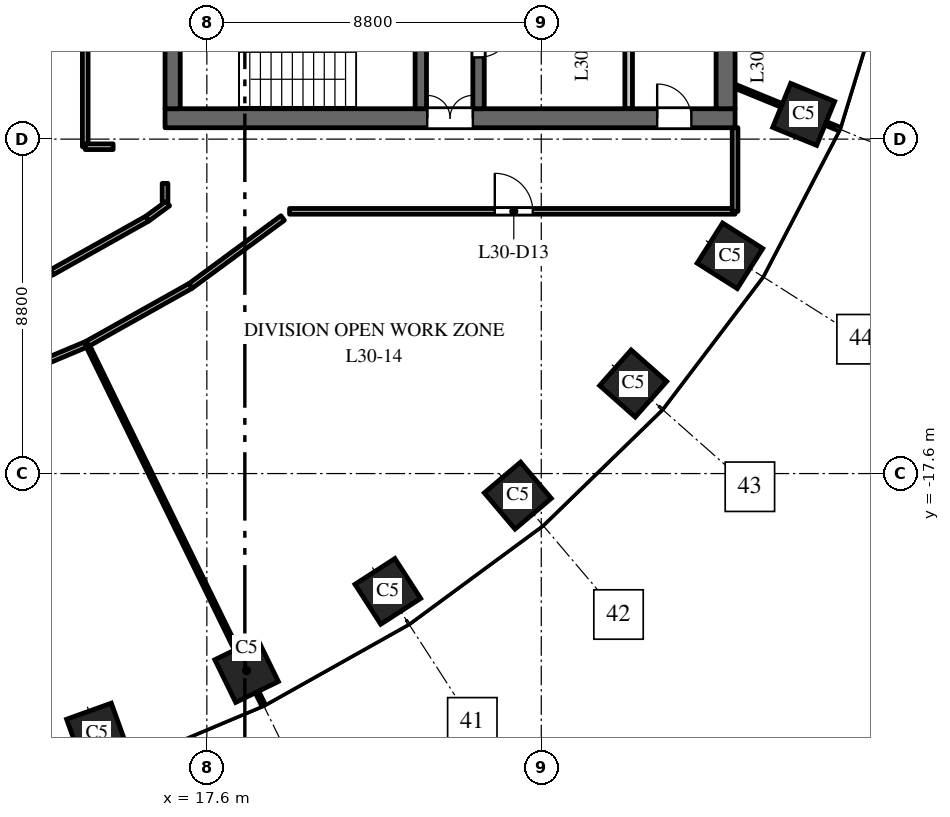
"""IFC4 building model, lengths in metres.
Left out: names, types, materials, properties, quantities, classifications, styles, units other than length and angle.
Written with IfcOpenShell. Run it as: python <this file> out.ifc"""

import sys

from ifc_helpers import new_model, si_unit, direction, frame, frame_2d, origin, origin_2d, place, context, subcontext, project, spatial, rectangle, extrude, element, fill, save


model = new_model("IFC4")
c1 = context("Model", 3, precision=1e-05, world=origin(), true_north=direction((0.0, 1.0)))
c2 = subcontext(c1, "Body", "Model", "MODEL_VIEW")
j1 = project(units=[si_unit("LENGTHUNIT", "METRE"), si_unit("PLANEANGLEUNIT", "RADIAN")], contexts=[c1])
p1 = place(None, origin())
s1 = spatial("IfcSite", under=j1, at=p1, CompositionType="ELEMENT")
p2 = place(p1, origin())
s2 = spatial("IfcBuilding", under=s1, at=p2, CompositionType="ELEMENT")
p3 = place(p2, frame((0.0, 0.0, 132.0)))
s3 = spatial("IfcBuildingStorey", under=s2, at=p3, CompositionType="ELEMENT", Elevation=132.0)
for number, where, z_axis, x_axis in (
    (1, (14.709, -24.441, 0.0), (0.0, 0.0, 1.0), (0.941, 0.338, 0.0)),
    (2, (18.646, -22.785, 0.0), (0.0, 0.0, 1.0), (0.898, 0.439, 0.0)),
    (3, (22.362, -20.7, 0.0), (0.0, 0.0, 1.0), (0.84, 0.542, 0.0)),
    (4, (25.783, -18.18, 0.0), (0.0, 0.0, 1.0), (0.763, 0.646, 0.0)),
    (5, (28.819, -15.23, 0.0), (0.0, 0.0, 1.0), (0.663, 0.749, 0.0)),
    (6, (31.365, -11.871, 0.0), (0.0, 0.0, 1.0), (0.535, 0.845, 0.0)),
    (7, (33.305, -8.149, 0.0), (0.0, 0.0, 1.0), (0.379, 0.925, 0.0)),
):
    element("IfcColumn", number, at=place(p3, frame(where, z_axis=z_axis, x_axis=x_axis)), inside=s3, PredefinedType="COLUMN", context=c2, shape_type="SweptSolid", body=[
        extrude(rectangle(XDim=1.25, YDim=1.25, at=origin_2d()), origin(), (0.0, 0.0, 1.0), 4.0),
    ])
p4 = place(p3, frame((16.5, -8.25, 0.0), z_axis=(0.0, 0.0, 1.0), x_axis=(1.0, 0.0, 0.0)))
e8 = element("IfcWall", 8, at=p4, inside=s3, PredefinedType="SHEAR", context=c2, shape_type="SweptSolid", body=[
    extrude(rectangle(XDim=15.0, YDim=0.5, at=frame_2d((7.5, 0.0))), origin(), (0.0, 0.0, 1.0), 3.7),
])
p5 = place(p4, frame((6.9, 0.0, 0.0)))
e9 = element("IfcOpeningElement", 9, at=p5, cuts=e8, PredefinedType="OPENING", context=c2, shape_type="SweptSolid", body=[
    extrude(rectangle(XDim=1.2, YDim=2.1, at=frame_2d((0.6, 1.05))), frame((0.0, 0.26, 0.0), z_axis=(0.0, -1.0, 0.0), x_axis=(1.0, 0.0, 0.0)), (0.0, 0.0, 1.0), 0.52),
])
p6 = place(p4, frame((12.95, 0.0, 0.0)))
e10 = element("IfcOpeningElement", 10, at=p6, cuts=e8, PredefinedType="OPENING", context=c2, shape_type="SweptSolid", body=[
    extrude(rectangle(XDim=0.9, YDim=2.1, at=frame_2d((0.45, 1.05))), frame((0.0, 0.26, 0.0), z_axis=(0.0, -1.0, 0.0), x_axis=(1.0, 0.0, 0.0)), (0.0, 0.0, 1.0), 0.52),
])
p7 = place(p3, frame((24.75, -8.0, 0.0), z_axis=(0.0, 0.0, 1.0), x_axis=(0.0, 1.0, 0.0)))
e11 = element("IfcWall", 11, at=p7, inside=s3, PredefinedType="SHEAR", context=c2, shape_type="SweptSolid", body=[
    extrude(rectangle(XDim=16.0, YDim=0.3, at=frame_2d((8.0, 0.0))), origin(), (0.0, 0.0, 1.0), 3.7),
])
p8 = place(p7, frame((4.425, 0.0, 0.0)))
e12 = element("IfcOpeningElement", 12, at=p8, cuts=e11, PredefinedType="OPENING", context=c2, shape_type="SweptSolid", body=[
    extrude(rectangle(XDim=1.1, YDim=2.1, at=frame_2d((0.55, 1.05))), frame((0.0, 0.16, 0.0), z_axis=(0.0, -1.0, 0.0), x_axis=(1.0, 0.0, 0.0)), (0.0, 0.0, 1.0), 0.32),
])
p9 = place(p7, frame((7.45, 0.0, 0.0)))
e13 = element("IfcOpeningElement", 13, at=p9, cuts=e11, PredefinedType="OPENING", context=c2, shape_type="SweptSolid", body=[
    extrude(rectangle(XDim=1.1, YDim=2.1, at=frame_2d((0.55, 1.05))), frame((0.0, 0.16, 0.0), z_axis=(0.0, -1.0, 0.0), x_axis=(1.0, 0.0, 0.0)), (0.0, 0.0, 1.0), 0.32),
])
p10 = place(p7, frame((10.425, 0.0, 0.0)))
e14 = element("IfcOpeningElement", 14, at=p10, cuts=e11, PredefinedType="OPENING", context=c2, shape_type="SweptSolid", body=[
    extrude(rectangle(XDim=1.2, YDim=2.1, at=frame_2d((0.6, 1.05))), frame((0.0, 0.16, 0.0), z_axis=(0.0, -1.0, 0.0), x_axis=(1.0, 0.0, 0.0)), (0.0, 0.0, 1.0), 0.32),
])
p11 = place(p7, frame((13.125, 0.0, 0.0)))
e15 = element("IfcOpeningElement", 15, at=p11, cuts=e11, PredefinedType="OPENING", context=c2, shape_type="SweptSolid", body=[
    extrude(rectangle(XDim=0.9, YDim=2.1, at=frame_2d((0.45, 1.05))), frame((0.0, 0.16, 0.0), z_axis=(0.0, -1.0, 0.0), x_axis=(1.0, 0.0, 0.0)), (0.0, 0.0, 1.0), 0.32),
])
p12 = place(p7, frame((14.75, 0.0, 0.0)))
e16 = element("IfcOpeningElement", 16, at=p12, cuts=e11, PredefinedType="OPENING", context=c2, shape_type="SweptSolid", body=[
    extrude(rectangle(XDim=0.9, YDim=2.1, at=frame_2d((0.45, 1.05))), frame((0.0, 0.16, 0.0), z_axis=(0.0, -1.0, 0.0), x_axis=(1.0, 0.0, 0.0)), (0.0, 0.0, 1.0), 0.32),
])
p13 = place(p7, frame((1.35, 0.0, 0.0)))
e17 = element("IfcOpeningElement", 17, at=p13, cuts=e11, PredefinedType="OPENING", context=c2, shape_type="SweptSolid", body=[
    extrude(rectangle(XDim=0.9, YDim=2.1, at=frame_2d((0.45, 1.05))), frame((0.0, 0.16, 0.0), z_axis=(0.0, -1.0, 0.0), x_axis=(1.0, 0.0, 0.0)), (0.0, 0.0, 1.0), 0.32),
])
p14 = place(p3, frame((16.7, -8.0, 0.0), z_axis=(0.0, 0.0, 1.0), x_axis=(0.0, 1.0, 0.0)))
e18 = element("IfcWall", 18, at=p14, inside=s3, PredefinedType="SHEAR", context=c2, shape_type="SweptSolid", body=[
    extrude(rectangle(XDim=16.0, YDim=0.4, at=frame_2d((8.0, 0.0))), origin(), (0.0, 0.0, 1.0), 3.7),
])
p15 = place(p3, frame((31.25, -8.0, 0.0), z_axis=(0.0, 0.0, 1.0), x_axis=(0.0, 1.0, 0.0)))
e19 = element("IfcWall", 19, at=p15, inside=s3, PredefinedType="SHEAR", context=c2, shape_type="SweptSolid", body=[
    extrude(rectangle(XDim=16.0, YDim=0.5, at=frame_2d((8.0, 0.0))), origin(), (0.0, 0.0, 1.0), 3.7),
])
p16 = place(p3, frame((28.7, -8.0, 0.0), z_axis=(0.0, 0.0, 1.0), x_axis=(0.0, 1.0, 0.0)))
e20 = element("IfcWall", 20, at=p16, inside=s3, PredefinedType="PARTITIONING", context=c2, shape_type="SweptSolid", body=[
    extrude(rectangle(XDim=3.25, YDim=0.2, at=frame_2d((1.625, 0.0))), origin(), (0.0, 0.0, 1.0), 3.7),
])
p17 = place(p3, frame((23.23, -8.0, 0.0), z_axis=(0.0, 0.0, 1.0), x_axis=(0.0, 1.0, 0.0)))
e21 = element("IfcWall", 21, at=p17, inside=s3, PredefinedType="SHEAR", context=c2, shape_type="SweptSolid", body=[
    extrude(rectangle(XDim=7.875, YDim=0.3, at=frame_2d((3.938, 0.0))), origin(), (0.0, 0.0, 1.0), 3.7),
])
p18 = place(p17, frame((5.15, 0.0, 0.0)))
e22 = element("IfcOpeningElement", 22, at=p18, cuts=e21, PredefinedType="OPENING", context=c2, shape_type="SweptSolid", body=[
    extrude(rectangle(XDim=1.1, YDim=2.1, at=frame_2d((0.55, 1.05))), frame((0.0, 0.16, 0.0), z_axis=(0.0, -1.0, 0.0), x_axis=(1.0, 0.0, 0.0)), (0.0, 0.0, 1.0), 0.32),
])
p19 = place(p3, frame((10.762, -13.463, 0.0), z_axis=(0.0, 0.0, 1.0), x_axis=(0.921848667289, 0.387550041438, 0.0)))
e23 = element("IfcWall", 23, at=p19, inside=s3, PredefinedType="PARTITIONING", context=c2, shape_type="SweptSolid", body=[
    extrude(rectangle(XDim=2.993, YDim=0.15, at=frame_2d((1.497, 0.0))), origin(), (0.0, 0.0, 1.0), 3.7),
])
p20 = place(p3, frame((11.473, -15.442, 0.0), z_axis=(0.0, 0.0, 1.0), x_axis=(0.921794929211, 0.387677841101, 0.0)))
e24 = element("IfcWall", 24, at=p20, inside=s3, PredefinedType="PARTITIONING", context=c2, shape_type="SweptSolid", body=[
    extrude(rectangle(XDim=3.224, YDim=0.15, at=frame_2d((1.612, 0.0))), origin(), (0.0, 0.0, 1.0), 3.7),
])
p21 = place(p3, frame((13.521, -12.303, 0.0), z_axis=(0.0, 0.0, 1.0), x_axis=(0.871948863789, 0.489596955604, 0.0)))
e25 = element("IfcWall", 25, at=p21, inside=s3, PredefinedType="PARTITIONING", context=c2, shape_type="SweptSolid", body=[
    extrude(rectangle(XDim=2.88, YDim=0.15, at=frame_2d((1.44, 0.0))), origin(), (0.0, 0.0, 1.0), 3.7),
])
p22 = place(p3, frame((14.4, -9.0, 0.0), z_axis=(0.0, 0.0, 1.0), x_axis=(0.0, 1.0, 0.0)))
e26 = element("IfcWall", 26, at=p22, inside=s3, PredefinedType="PARTITIONING", context=c2, shape_type="SweptSolid", body=[
    extrude(rectangle(XDim=18.0, YDim=0.15, at=frame_2d((9.0, 0.0))), origin(), (0.0, 0.0, 1.0), 2.75),
])
p23 = place(p22, frame((8.6, 0.0, 0.0)))
e27 = element("IfcOpeningElement", 27, at=p23, cuts=e26, PredefinedType="OPENING", context=c2, shape_type="SweptSolid", body=[
    extrude(rectangle(XDim=1.0, YDim=2.1, at=frame_2d((0.5, 1.05))), frame((0.0, 0.085, 0.0), z_axis=(0.0, -1.0, 0.0), x_axis=(1.0, 0.0, 0.0)), (0.0, 0.0, 1.0), 0.17),
])
p24 = place(p3, frame((14.4, -9.0, 0.0), z_axis=(0.0, 0.0, 1.0), x_axis=(1.0, 0.0, 0.0)))
e28 = element("IfcWall", 28, at=p24, inside=s3, PredefinedType="PARTITIONING", context=c2, shape_type="SweptSolid", body=[
    extrude(rectangle(XDim=0.734, YDim=0.15, at=frame_2d((0.367, 0.0))), origin(), (0.0, 0.0, 1.0), 3.7),
])
p25 = place(p3, frame((14.447, -14.196, 0.0), z_axis=(0.0, 0.0, 1.0), x_axis=(0.439198109491, -0.898390238493, 0.0)))
e29 = element("IfcWall", 29, at=p25, inside=s3, PredefinedType="PARTITIONING", context=c2, shape_type="SweptSolid", body=[
    extrude(rectangle(XDim=10.562, YDim=0.1, at=frame_2d((5.281, 0.0))), origin(), (0.0, 0.0, 1.0), 2.9),
])
p26 = place(p3, frame((14.462, -14.182, 0.0), z_axis=(0.0, 0.0, 1.0), x_axis=(0.872130780857, 0.489272828882, 0.0)))
e30 = element("IfcWall", 30, at=p26, inside=s3, PredefinedType="PARTITIONING", context=c2, shape_type="SweptSolid", body=[
    extrude(rectangle(XDim=3.109, YDim=0.15, at=frame_2d((1.554, 0.0))), origin(), (0.0, 0.0, 1.0), 3.7),
])
p27 = place(p3, frame((16.032, -10.893, 0.0), z_axis=(0.0, 0.0, 1.0), x_axis=(0.805701862575, 0.592321288359, 0.0)))
e31 = element("IfcWall", 31, at=p27, inside=s3, PredefinedType="PARTITIONING", context=c2, shape_type="SweptSolid", body=[
    extrude(rectangle(XDim=0.674, YDim=0.15, at=frame_2d((0.337, 0.0))), origin(), (0.0, 0.0, 1.0), 3.7),
])
p28 = place(p3, frame((16.5, -10.456, 0.0), z_axis=(0.0, 0.0, 1.0), x_axis=(0.0, 1.0, 0.0)))
e32 = element("IfcWall", 32, at=p28, inside=s3, PredefinedType="PARTITIONING", context=c2, shape_type="SweptSolid", body=[
    extrude(rectangle(XDim=0.492, YDim=0.15, at=frame_2d((0.246, 0.0))), origin(), (0.0, 0.0, 1.0), 3.7),
])
p29 = place(p3, frame((17.173, -12.661, 0.0), z_axis=(0.0, 0.0, 1.0), x_axis=(0.805151708762, 0.593068904831, 0.0)))
e33 = element("IfcWall", 33, at=p29, inside=s3, PredefinedType="PARTITIONING", context=c2, shape_type="SweptSolid", body=[
    extrude(rectangle(XDim=3.008, YDim=0.15, at=frame_2d((1.504, 0.0))), origin(), (0.0, 0.0, 1.0), 3.7),
])
p30 = place(p3, frame((19.777, -10.7, 0.0), z_axis=(0.0, 0.0, 1.0), x_axis=(1.0, 0.0, 0.0)))
e34 = element("IfcWall", 34, at=p30, inside=s3, PredefinedType="PARTITIONING", context=c2, shape_type="SweptSolid", body=[
    extrude(rectangle(XDim=11.723, YDim=0.15, at=frame_2d((5.861, 0.0))), origin(), (0.0, 0.0, 1.0), 2.75),
])
p31 = place(p30, frame((5.4, 0.0, 0.0)))
e35 = element("IfcOpeningElement", 35, at=p31, cuts=e34, PredefinedType="OPENING", context=c2, shape_type="SweptSolid", body=[
    extrude(rectangle(XDim=1.0, YDim=2.1, at=frame_2d((0.5, 1.05))), frame((0.0, 0.085, 0.0), z_axis=(0.0, -1.0, 0.0), x_axis=(1.0, 0.0, 0.0)), (0.0, 0.0, 1.0), 0.17),
])
p32 = place(p3, frame((31.5, -10.7, 0.0), z_axis=(0.0, 0.0, 1.0), x_axis=(0.0, 1.0, 0.0)))
e36 = element("IfcWall", 36, at=p32, inside=s3, PredefinedType="PARTITIONING", context=c2, shape_type="SweptSolid", body=[
    extrude(rectangle(XDim=2.2, YDim=0.15, at=frame_2d((1.1, 0.0))), origin(), (0.0, 0.0, 1.0), 2.9),
])
p33 = place(p3, frame((31.5, -7.41, 0.0), z_axis=(0.0, 0.0, 1.0), x_axis=(0.925344112436, -0.379128307542, 0.0)))
e37 = element("IfcWall", 37, at=p33, inside=s3, PredefinedType="PARTITIONING", context=c2, shape_type="SweptSolid", body=[
    extrude(rectangle(XDim=2.954, YDim=0.1, at=frame_2d((1.477, 0.0))), origin(), (0.0, 0.0, 1.0), 3.7),
])
p34 = place(p5, origin())
e38 = element("IfcDoor", 38, at=p34, inside=s3, OperationType="DOUBLE_DOOR_DOUBLE_SWING", PredefinedType="DOOR", context=c2, shape_type="SweptSolid", body=[
    extrude(rectangle(XDim=1.2, YDim=2.1, at=frame_2d((0.6, 1.05))), frame((0.0, 0.025, 0.0), z_axis=(0.0, -1.0, 0.0), x_axis=(1.0, 0.0, 0.0)), (0.0, 0.0, 1.0), 0.05),
])
fill(e9, e38)
p35 = place(p13, origin())
e39 = element("IfcDoor", 39, at=p35, inside=s3, OperationType="SINGLE_SWING_RIGHT", PredefinedType="DOOR", context=c2, shape_type="SweptSolid", body=[
    extrude(rectangle(XDim=0.9, YDim=2.1, at=frame_2d((0.45, 1.05))), frame((0.0, 0.025, 0.0), z_axis=(0.0, -1.0, 0.0), x_axis=(1.0, 0.0, 0.0)), (0.0, 0.0, 1.0), 0.05),
])
fill(e17, e39)
p36 = place(p6, origin())
e40 = element("IfcDoor", 40, at=p36, inside=s3, OperationType="SINGLE_SWING_RIGHT", PredefinedType="DOOR", context=c2, shape_type="SweptSolid", body=[
    extrude(rectangle(XDim=0.9, YDim=2.1, at=frame_2d((0.45, 1.05))), frame((0.0, 0.025, 0.0), z_axis=(0.0, -1.0, 0.0), x_axis=(1.0, 0.0, 0.0)), (0.0, 0.0, 1.0), 0.05),
])
fill(e10, e40)
p37 = place(p31, origin())
e41 = element("IfcDoor", 41, at=p37, inside=s3, OperationType="SINGLE_SWING_LEFT", PredefinedType="DOOR", context=c2, shape_type="SweptSolid", body=[
    extrude(rectangle(XDim=1.0, YDim=2.1, at=frame_2d((0.5, 1.05))), frame((0.0, 0.025, 0.0), z_axis=(0.0, -1.0, 0.0), x_axis=(1.0, 0.0, 0.0)), (0.0, 0.0, 1.0), 0.05),
])
fill(e35, e41)
save(model, sys.argv[1])
